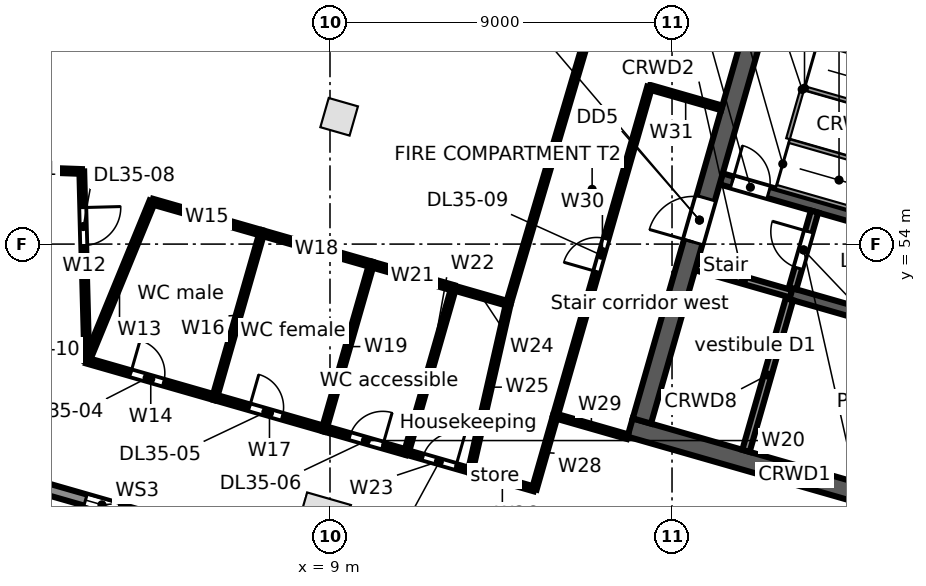
"""IFC4 building model, lengths in metres.
Left out: names, types, materials, properties, quantities, classifications, styles, units other than length and angle.
Written with IfcOpenShell. Run it as: python <this file> out.ifc"""

import sys

from ifc_helpers import new_model, si_unit, direction, frame, frame_2d, origin, origin_2d, place, context, subcontext, project, spatial, rectangle, extrude, element, fill, save


model = new_model("IFC4")
c1 = context("Model", 3, precision=1e-05, world=origin(), true_north=direction((0.0, 1.0)))
c2 = subcontext(c1, "Body", "Model", "MODEL_VIEW")
j1 = project(units=[si_unit("LENGTHUNIT", "METRE"), si_unit("PLANEANGLEUNIT", "RADIAN")], contexts=[c1])
p1 = place(None, origin())
s1 = spatial("IfcSite", under=j1, at=p1, CompositionType="ELEMENT")
p2 = place(p1, origin())
s2 = spatial("IfcBuilding", under=s1, at=p2, CompositionType="ELEMENT")
p3 = place(p2, frame((0.0, 0.0, 166.9)))
s3 = spatial("IfcBuildingStorey", under=s2, at=p3, CompositionType="ELEMENT", Elevation=166.9)
p4 = place(p3, frame((8.81, 46.722, 0.0), z_axis=(0.0, 0.0, 1.0), x_axis=(0.961261695938, -0.275637355817, 0.0)))
e1 = element("IfcColumn", 1, at=p4, inside=s3, PredefinedType="COLUMN", context=c2, shape_type="SweptSolid", body=[
    extrude(rectangle(XDim=1.2, YDim=1.2, at=origin_2d()), origin(), (0.0, 0.0, 1.0), 4.0),
])
p5 = place(p3, frame((9.241, 57.35, 0.0), z_axis=(0.0, 0.0, 1.0), x_axis=(0.961261695938, -0.275637355817, 0.0)))
e2 = element("IfcColumn", 2, at=p5, inside=s3, PredefinedType="COLUMN", context=c2, shape_type="SweptSolid", body=[
    extrude(rectangle(XDim=0.8, YDim=0.8, at=origin_2d()), origin(), (0.0, 0.0, 1.0), 4.0),
])
p6 = place(p3, frame((24.042, 41.106, 0.0), z_axis=(0.0, 0.0, 1.0), x_axis=(-0.961261693976, 0.275637362661, 0.0)))
e3 = element("IfcWall", 3, at=p6, inside=s3, PredefinedType="STANDARD", context=c2, shape_type="SweptSolid", body=[
    extrude(rectangle(XDim=24.948, YDim=0.3, at=frame_2d((12.474, 0.0))), origin(), (0.0, 0.0, 1.0), 3.68),
])
p7 = place(p6, frame((21.441, 0.0, 0.6)))
e4 = element("IfcOpeningElement", 4, at=p7, cuts=e3, PredefinedType="OPENING", context=c2, shape_type="SweptSolid", body=[
    extrude(rectangle(XDim=0.9, YDim=2.4, at=frame_2d((0.45, 1.2))), frame((0.0, 0.16, 0.0), z_axis=(0.0, -1.0, 0.0), x_axis=(1.0, 0.0, 0.0)), (0.0, 0.0, 1.0), 0.32),
])
p8 = place(p6, frame((13.121, 0.0, 0.6)))
e5 = element("IfcOpeningElement", 5, at=p8, cuts=e3, PredefinedType="OPENING", context=c2, shape_type="SweptSolid", body=[
    extrude(rectangle(XDim=0.9, YDim=2.4, at=frame_2d((0.45, 1.2))), frame((0.0, 0.16, 0.0), z_axis=(0.0, -1.0, 0.0), x_axis=(1.0, 0.0, 0.0)), (0.0, 0.0, 1.0), 0.32),
])
p9 = place(p6, frame((10.591, 0.0, 0.0)))
e6 = element("IfcOpeningElement", 6, at=p9, cuts=e3, PredefinedType="OPENING", context=c2, shape_type="SweptSolid", body=[
    extrude(rectangle(XDim=1.8, YDim=2.4, at=frame_2d((0.9, 1.2))), frame((0.0, 0.16, 0.0), z_axis=(0.0, -1.0, 0.0), x_axis=(1.0, 0.0, 0.0)), (0.0, 0.0, 1.0), 0.32),
])
p10 = place(p6, frame((4.8, 0.0, 0.6)))
e7 = element("IfcOpeningElement", 7, at=p10, cuts=e3, PredefinedType="OPENING", context=c2, shape_type="SweptSolid", body=[
    extrude(rectangle(XDim=0.9, YDim=2.4, at=frame_2d((0.45, 1.2))), frame((0.0, 0.16, 0.0), z_axis=(0.0, -1.0, 0.0), x_axis=(1.0, 0.0, 0.0)), (0.0, 0.0, 1.0), 0.32),
])
p11 = place(p6, frame((2.27, 0.0, 0.0)))
e8 = element("IfcOpeningElement", 8, at=p11, cuts=e3, PredefinedType="OPENING", context=c2, shape_type="SweptSolid", body=[
    extrude(rectangle(XDim=1.8, YDim=2.4, at=frame_2d((0.9, 1.2))), frame((0.0, 0.16, 0.0), z_axis=(0.0, -1.0, 0.0), x_axis=(1.0, 0.0, 0.0)), (0.0, 0.0, 1.0), 0.32),
])
p12 = place(p3, frame((16.897, 49.173, 0.0), z_axis=(0.0, 0.0, 1.0), x_axis=(0.96126248289, -0.275634611374, 0.0)))
e9 = element("IfcWall", 9, at=p12, inside=s3, PredefinedType="SOLIDWALL", context=c2, shape_type="SweptSolid", body=[
    extrude(rectangle(XDim=9.0, YDim=0.5, at=frame_2d((4.5, 0.0))), origin(), (0.0, 0.0, 1.0), 3.68),
])
p13 = place(p3, frame((18.632, 53.409, 0.0), z_axis=(0.0, 0.0, 1.0), x_axis=(0.961247078216, -0.275688328772, 0.0)))
e10 = element("IfcWall", 10, at=p13, inside=s3, PredefinedType="SOLIDWALL", context=c2, shape_type="SweptSolid", body=[
    extrude(rectangle(XDim=2.6, YDim=0.2, at=frame_2d((1.3, 0.0))), origin(), (0.0, 0.0, 1.0), 3.68),
])
p14 = place(p3, frame((21.131, 52.692, 0.0), z_axis=(0.0, 0.0, 1.0), x_axis=(0.961271043721, -0.27560475414, 0.0)))
e11 = element("IfcWall", 11, at=p14, inside=s3, PredefinedType="SOLIDWALL", context=c2, shape_type="SweptSolid", body=[
    extrude(rectangle(XDim=5.4, YDim=0.3, at=frame_2d((2.7, 0.0))), origin(), (0.0, 0.0, 1.0), 3.68),
])
p15 = place(p14, frame((2.35, 0.0, 0.0)))
e12 = element("IfcOpeningElement", 12, at=p15, cuts=e11, PredefinedType="OPENING", context=c2, shape_type="SweptSolid", body=[
    extrude(rectangle(XDim=0.9, YDim=2.1, at=frame_2d((0.45, 1.05))), frame((0.0, 0.16, 0.0), z_axis=(0.0, -1.0, 0.0), x_axis=(1.0, 0.0, 0.0)), (0.0, 0.0, 1.0), 0.32),
])
p16 = place(p3, frame((19.293, 55.716, 0.0), z_axis=(0.0, 0.0, 1.0), x_axis=(0.96125862491, -0.275648065539, 0.0)))
e13 = element("IfcWall", 13, at=p16, inside=s3, PredefinedType="SOLIDWALL", context=c2, shape_type="SweptSolid", body=[
    extrude(rectangle(XDim=7.2, YDim=0.3, at=frame_2d((3.6, 0.0))), origin(), (0.0, 0.0, 1.0), 3.68),
])
p17 = place(p16, frame((0.3, 0.0, 0.0)))
e14 = element("IfcOpeningElement", 14, at=p17, cuts=e13, PredefinedType="OPENING", context=c2, shape_type="SweptSolid", body=[
    extrude(rectangle(XDim=1.0, YDim=2.1, at=frame_2d((0.5, 1.05))), frame((0.0, 0.16, 0.0), z_axis=(0.0, -1.0, 0.0), x_axis=(1.0, 0.0, 0.0)), (0.0, 0.0, 1.0), 0.32),
])
p18 = place(p3, frame((20.067, 60.228, 0.0), z_axis=(0.0, 0.0, 1.0), x_axis=(0.96126248289, -0.275634611374, 0.0)))
e15 = element("IfcWall", 15, at=p18, inside=s3, PredefinedType="SOLIDWALL", context=c2, shape_type="SweptSolid", body=[
    extrude(rectangle(XDim=9.0, YDim=0.5, at=frame_2d((4.5, 0.0))), origin(), (0.0, 0.0, 1.0), 3.68),
])
p19 = place(p3, frame((17.206, 49.344, 0.0), z_axis=(0.0, 0.0, 1.0), x_axis=(0.275632651182, 0.961263044958, 0.0)))
e16 = element("IfcWall", 16, at=p19, inside=s3, PredefinedType="SOLIDWALL", context=c2, shape_type="SweptSolid", body=[
    extrude(rectangle(XDim=11.0, YDim=0.5, at=frame_2d((5.5, 0.0))), origin(), (0.0, 0.0, 1.0), 3.68),
])
p20 = place(p19, frame((4.9, 0.0, 0.0)))
e17 = element("IfcOpeningElement", 17, at=p20, cuts=e16, PredefinedType="OPENING", context=c2, shape_type="SweptSolid", body=[
    extrude(rectangle(XDim=1.2, YDim=2.1, at=frame_2d((0.6, 1.05))), frame((0.0, 0.26, 0.0), z_axis=(0.0, -1.0, 0.0), x_axis=(1.0, 0.0, 0.0)), (0.0, 0.0, 1.0), 0.52),
])
p21 = place(p3, frame((19.946, 48.559, 0.0), z_axis=(0.0, 0.0, 1.0), x_axis=(0.275668905258, 0.961252648721, 0.0)))
e18 = element("IfcWall", 18, at=p21, inside=s3, PredefinedType="SOLIDWALL", context=c2, shape_type="SweptSolid", body=[
    extrude(rectangle(XDim=4.15, YDim=0.2, at=frame_2d((2.075, 0.0))), origin(), (0.0, 0.0, 1.0), 3.68),
])
p22 = place(p3, frame((21.172, 52.837, 0.0), z_axis=(0.0, 0.0, 1.0), x_axis=(0.275657676022, 0.961255868981, 0.0)))
e19 = element("IfcWall", 19, at=p22, inside=s3, PredefinedType="PARTITIONING", context=c2, shape_type="SweptSolid", body=[
    extrude(rectangle(XDim=2.1, YDim=0.2, at=frame_2d((1.05, 0.0))), origin(), (0.0, 0.0, 1.0), 3.68),
])
p23 = place(p22, frame((0.55, 0.0, 0.0)))
e20 = element("IfcOpeningElement", 20, at=p23, cuts=e19, PredefinedType="OPENING", context=c2, shape_type="SweptSolid", body=[
    extrude(rectangle(XDim=1.0, YDim=2.1, at=frame_2d((0.5, 1.05))), frame((0.0, 0.11, 0.0), z_axis=(0.0, -1.0, 0.0), x_axis=(1.0, 0.0, 0.0)), (0.0, 0.0, 1.0), 0.22),
])
p24 = place(p3, frame((0.0, 56.0, 0.0), z_axis=(0.0, 0.0, 1.0), x_axis=(0.999349313684, -0.036068673934, 0.0)))
e21 = element("IfcWall", 21, at=p24, inside=s3, PredefinedType="PARTITIONING", context=c2, shape_type="SweptSolid", body=[
    extrude(rectangle(XDim=2.471, YDim=0.125, at=frame_2d((1.235, 0.0))), origin(), (0.0, 0.0, 1.0), 3.68),
])
p25 = place(p3, frame((2.469, 55.911, 0.0), z_axis=(0.0, 0.0, 1.0), x_axis=(0.02651808123, -0.999648333849, 0.0)))
e22 = element("IfcWall", 22, at=p25, inside=s3, PredefinedType="PARTITIONING", context=c2, shape_type="SweptSolid", body=[
    extrude(rectangle(XDim=4.981, YDim=0.125, at=frame_2d((2.49, 0.0))), origin(), (0.0, 0.0, 1.0), 3.68),
])
p26 = place(p25, frame((0.95, 0.0, 0.0)))
e23 = element("IfcOpeningElement", 23, at=p26, cuts=e22, PredefinedType="OPENING", context=c2, shape_type="SweptSolid", body=[
    extrude(rectangle(XDim=1.0, YDim=2.1, at=frame_2d((0.5, 1.05))), frame((0.0, 0.073, 0.0), z_axis=(0.0, -1.0, 0.0), x_axis=(1.0, 0.0, 0.0)), (0.0, 0.0, 1.0), 0.145),
])
p27 = place(p3, frame((2.601, 50.932, 0.0), z_axis=(0.0, 0.0, 1.0), x_axis=(0.380066317543, 0.924959239247, 0.0)))
e24 = element("IfcWall", 24, at=p27, inside=s3, PredefinedType="PARTITIONING", context=c2, shape_type="SweptSolid", body=[
    extrude(rectangle(XDim=4.528, YDim=0.15, at=frame_2d((2.264, 0.0))), origin(), (0.0, 0.0, 1.0), 3.68),
])
p28 = place(p3, frame((2.601, 50.932, 0.0), z_axis=(0.0, 0.0, 1.0), x_axis=(0.961265606965, -0.27562371608, 0.0)))
e25 = element("IfcWall", 25, at=p28, inside=s3, PredefinedType="PARTITIONING", context=c2, shape_type="SweptSolid", body=[
    extrude(rectangle(XDim=3.5, YDim=0.15, at=frame_2d((1.75, 0.0))), origin(), (0.0, 0.0, 1.0), 3.68),
])
p29 = place(p28, frame((1.2, 0.0, 0.0)))
e26 = element("IfcOpeningElement", 26, at=p29, cuts=e25, PredefinedType="OPENING", context=c2, shape_type="SweptSolid", body=[
    extrude(rectangle(XDim=0.9, YDim=2.1, at=frame_2d((0.45, 1.05))), frame((0.0, 0.085, 0.0), z_axis=(0.0, -1.0, 0.0), x_axis=(1.0, 0.0, 0.0)), (0.0, 0.0, 1.0), 0.17),
])
p30 = place(p3, frame((4.322, 55.12, 0.0), z_axis=(0.0, 0.0, 1.0), x_axis=(0.961247103494, -0.275688240636, 0.0)))
e27 = element("IfcWall", 27, at=p30, inside=s3, PredefinedType="PARTITIONING", context=c2, shape_type="SweptSolid", body=[
    extrude(rectangle(XDim=3.0, YDim=0.15, at=frame_2d((1.5, 0.0))), origin(), (0.0, 0.0, 1.0), 3.68),
])
p31 = place(p3, frame((5.966, 49.967, 0.0), z_axis=(0.0, 0.0, 1.0), x_axis=(0.275545040649, 0.96128816209, 0.0)))
e28 = element("IfcWall", 28, at=p31, inside=s3, PredefinedType="PARTITIONING", context=c2, shape_type="SweptSolid", body=[
    extrude(rectangle(XDim=4.5, YDim=0.125, at=frame_2d((2.25, 0.0))), origin(), (0.0, 0.0, 1.0), 3.68),
])
p32 = place(p3, frame((5.966, 49.967, 0.0), z_axis=(0.0, 0.0, 1.0), x_axis=(0.961222353496, -0.275774522283, 0.0)))
e29 = element("IfcWall", 29, at=p32, inside=s3, PredefinedType="PARTITIONING", context=c2, shape_type="SweptSolid", body=[
    extrude(rectangle(XDim=2.999, YDim=0.15, at=frame_2d((1.5, 0.0))), origin(), (0.0, 0.0, 1.0), 2.852),
])
p33 = place(p32, frame((0.95, 0.0, 0.0)))
e30 = element("IfcOpeningElement", 30, at=p33, cuts=e29, PredefinedType="OPENING", context=c2, shape_type="SweptSolid", body=[
    extrude(rectangle(XDim=0.9, YDim=2.1, at=frame_2d((0.45, 1.05))), frame((0.0, 0.085, 0.0), z_axis=(0.0, -1.0, 0.0), x_axis=(1.0, 0.0, 0.0)), (0.0, 0.0, 1.0), 0.17),
])
p34 = place(p3, frame((7.206, 54.293, 0.0), z_axis=(0.0, 0.0, 1.0), x_axis=(0.961268664977, -0.27561305073, 0.0)))
e31 = element("IfcWall", 31, at=p34, inside=s3, PredefinedType="PARTITIONING", context=c2, shape_type="SweptSolid", body=[
    extrude(rectangle(XDim=3.0, YDim=0.15, at=frame_2d((1.5, 0.0))), origin(), (0.0, 0.0, 1.0), 2.852),
])
p35 = place(p3, frame((8.849, 49.14, 0.0), z_axis=(0.0, 0.0, 1.0), x_axis=(0.275731175537, 0.961234788612, 0.0)))
e32 = element("IfcWall", 32, at=p35, inside=s3, PredefinedType="PARTITIONING", context=c2, shape_type="SweptSolid", body=[
    extrude(rectangle(XDim=4.501, YDim=0.125, at=frame_2d((2.25, 0.0))), origin(), (0.0, 0.0, 1.0), 2.852),
])
p36 = place(p3, frame((8.849, 49.14, 0.0), z_axis=(0.0, 0.0, 1.0), x_axis=(0.961298413165, -0.275509275429, 0.0)))
e33 = element("IfcWall", 33, at=p36, inside=s3, PredefinedType="PARTITIONING", context=c2, shape_type="SweptSolid", body=[
    extrude(rectangle(XDim=2.25, YDim=0.15, at=frame_2d((1.125, 0.0))), origin(), (0.0, 0.0, 1.0), 2.748),
])
p37 = place(p36, frame((0.7, 0.0, 0.0)))
e34 = element("IfcOpeningElement", 34, at=p37, cuts=e33, PredefinedType="OPENING", context=c2, shape_type="SweptSolid", body=[
    extrude(rectangle(XDim=0.9, YDim=2.1, at=frame_2d((0.45, 1.05))), frame((0.0, 0.085, 0.0), z_axis=(0.0, -1.0, 0.0), x_axis=(1.0, 0.0, 0.0)), (0.0, 0.0, 1.0), 0.17),
])
p38 = place(p3, frame((10.09, 53.466, 0.0), z_axis=(0.0, 0.0, 1.0), x_axis=(0.961269670038, -0.275609545309, 0.0)))
e35 = element("IfcWall", 35, at=p38, inside=s3, PredefinedType="PARTITIONING", context=c2, shape_type="SweptSolid", body=[
    extrude(rectangle(XDim=2.25, YDim=0.15, at=frame_2d((1.125, 0.0))), origin(), (0.0, 0.0, 1.0), 2.748),
])
p39 = place(p3, frame((11.012, 48.52, 0.0), z_axis=(0.0, 0.0, 1.0), x_axis=(0.275745553681, 0.96123066411, 0.0)))
e36 = element("IfcWall", 36, at=p39, inside=s3, PredefinedType="PARTITIONING", context=c2, shape_type="SweptSolid", body=[
    extrude(rectangle(XDim=4.5, YDim=0.125, at=frame_2d((2.25, 0.0))), origin(), (0.0, 0.0, 1.0), 3.68),
])
p40 = place(p3, frame((11.012, 48.52, 0.0), z_axis=(0.0, 0.0, 1.0), x_axis=(0.961323619822, -0.275421309946, 0.0)))
e37 = element("IfcWall", 37, at=p40, inside=s3, PredefinedType="PARTITIONING", context=c2, shape_type="SweptSolid", body=[
    extrude(rectangle(XDim=1.75, YDim=0.125, at=frame_2d((0.875, 0.0))), origin(), (0.0, 0.0, 1.0), 3.68),
])
p41 = place(p40, frame((0.45, 0.0, 0.0)))
e38 = element("IfcOpeningElement", 38, at=p41, cuts=e37, PredefinedType="OPENING", context=c2, shape_type="SweptSolid", body=[
    extrude(rectangle(XDim=0.9, YDim=2.1, at=frame_2d((0.45, 1.05))), frame((0.0, 0.073, 0.0), z_axis=(0.0, -1.0, 0.0), x_axis=(1.0, 0.0, 0.0)), (0.0, 0.0, 1.0), 0.145),
])
p42 = place(p3, frame((12.253, 52.846, 0.0), z_axis=(0.0, 0.0, 1.0), x_axis=(0.961117390016, -0.276140114089, 0.0)))
e39 = element("IfcWall", 39, at=p42, inside=s3, PredefinedType="PARTITIONING", context=c2, shape_type="SweptSolid", body=[
    extrude(rectangle(XDim=1.5, YDim=0.125, at=frame_2d((0.75, 0.0))), origin(), (0.0, 0.0, 1.0), 3.68),
])
p43 = place(p3, frame((12.694, 48.038, 0.0), z_axis=(0.0, 0.0, 1.0), x_axis=(0.221918494106, 0.975065219344, 0.0)))
e40 = element("IfcWall", 40, at=p43, inside=s3, PredefinedType="PARTITIONING", context=c2, shape_type="SweptSolid", body=[
    extrude(rectangle(XDim=4.506, YDim=0.125, at=frame_2d((2.253, 0.0))), origin(), (0.0, 0.0, 1.0), 3.68),
])
p44 = place(p3, frame((12.694, 48.038, 0.0), z_axis=(0.0, 0.0, 1.0), x_axis=(0.961170605556, -0.275954827854, 0.0)))
e41 = element("IfcWall", 41, at=p44, inside=s3, PredefinedType="PARTITIONING", context=c2, shape_type="SweptSolid", body=[
    extrude(rectangle(XDim=1.751, YDim=0.125, at=frame_2d((0.875, 0.0))), origin(), (0.0, 0.0, 1.0), 3.68),
])
p45 = place(p3, frame((13.694, 52.432, 0.0), z_axis=(0.0, 0.0, 1.0), x_axis=(0.28327517645, 0.959038672008, 0.0)))
e42 = element("IfcWall", 42, at=p45, inside=s3, PredefinedType="PARTITIONING", context=c2, shape_type="SweptSolid", body=[
    extrude(rectangle(XDim=14.886, YDim=0.125, at=frame_2d((7.443, 0.0))), origin(), (0.0, 0.0, 1.0), 2.748),
])
p46 = place(p3, frame((14.377, 47.555, 0.0), z_axis=(0.0, 0.0, 1.0), x_axis=(0.275446387355, 0.961316434736, 0.0)))
e43 = element("IfcWall", 43, at=p46, inside=s3, PredefinedType="PARTITIONING", context=c2, shape_type="SweptSolid", body=[
    extrude(rectangle(XDim=2.0, YDim=0.125, at=frame_2d((1.0, 0.0))), origin(), (0.0, 0.0, 1.0), 3.68),
])
p47 = place(p3, frame((14.928, 49.478, 0.0), z_axis=(0.0, 0.0, 1.0), x_axis=(0.961243778232, -0.27569983462, 0.0)))
e44 = element("IfcWall", 44, at=p47, inside=s3, PredefinedType="PARTITIONING", context=c2, shape_type="SweptSolid", body=[
    extrude(rectangle(XDim=1.977, YDim=0.125, at=frame_2d((0.988, 0.0))), origin(), (0.0, 0.0, 1.0), 3.68),
])
p48 = place(p3, frame((14.928, 49.478, 0.0), z_axis=(0.0, 0.0, 1.0), x_axis=(0.275674053528, 0.961251172281, 0.0)))
e45 = element("IfcWall", 45, at=p48, inside=s3, PredefinedType="PARTITIONING", context=c2, shape_type="SweptSolid", body=[
    extrude(rectangle(XDim=9.0, YDim=0.125, at=frame_2d((4.5, 0.0))), origin(), (0.0, 0.0, 1.0), 2.748),
])
p49 = place(p48, frame((3.95, 0.0, 0.0)))
e46 = element("IfcOpeningElement", 46, at=p49, cuts=e45, PredefinedType="OPENING", context=c2, shape_type="SweptSolid", body=[
    extrude(rectangle(XDim=0.9, YDim=2.1, at=frame_2d((0.45, 1.05))), frame((0.0, 0.073, 0.0), z_axis=(0.0, -1.0, 0.0), x_axis=(1.0, 0.0, 0.0)), (0.0, 0.0, 1.0), 0.145),
])
p50 = place(p3, frame((17.409, 58.129, 0.0), z_axis=(0.0, 0.0, 1.0), x_axis=(0.961253165474, -0.275667103345, 0.0)))
e47 = element("IfcWall", 47, at=p50, inside=s3, PredefinedType="PARTITIONING", context=c2, shape_type="SweptSolid", body=[
    extrude(rectangle(XDim=1.977, YDim=0.125, at=frame_2d((0.988, 0.0))), origin(), (0.0, 0.0, 1.0), 3.68),
])
p51 = place(p7, origin())
e48 = element("IfcWindow", 48, at=p51, inside=s3, PartitioningType="SINGLE_PANEL", PredefinedType="WINDOW", context=c2, shape_type="SweptSolid", body=[
    extrude(rectangle(XDim=0.9, YDim=2.4, at=frame_2d((0.45, 1.2))), frame((0.0, 0.03, 0.0), z_axis=(0.0, -1.0, 0.0), x_axis=(1.0, 0.0, 0.0)), (0.0, 0.0, 1.0), 0.06),
])
fill(e4, e48)
p52 = place(p17, origin())
e49 = element("IfcDoor", 49, at=p52, inside=s3, OperationType="SINGLE_SWING_LEFT", PredefinedType="DOOR", context=c2, shape_type="SweptSolid", body=[
    extrude(rectangle(XDim=1.0, YDim=2.1, at=frame_2d((0.5, 1.05))), frame((0.0, 0.025, 0.0), z_axis=(0.0, -1.0, 0.0), x_axis=(1.0, 0.0, 0.0)), (0.0, 0.0, 1.0), 0.05),
])
fill(e14, e49)
p53 = place(p23, origin())
e50 = element("IfcDoor", 50, at=p53, inside=s3, OperationType="SINGLE_SWING_RIGHT", PredefinedType="DOOR", context=c2, shape_type="SweptSolid", body=[
    extrude(rectangle(XDim=1.0, YDim=2.1, at=frame_2d((0.5, 1.05))), frame((0.0, 0.025, 0.0), z_axis=(0.0, -1.0, 0.0), x_axis=(1.0, 0.0, 0.0)), (0.0, 0.0, 1.0), 0.05),
])
fill(e20, e50)
p54 = place(p20, origin())
e51 = element("IfcDoor", 51, at=p54, inside=s3, OperationType="SINGLE_SWING_LEFT", PredefinedType="DOOR", context=c2, shape_type="SweptSolid", body=[
    extrude(rectangle(XDim=1.2, YDim=2.1, at=frame_2d((0.6, 1.05))), frame((0.0, 0.025, 0.0), z_axis=(0.0, -1.0, 0.0), x_axis=(1.0, 0.0, 0.0)), (0.0, 0.0, 1.0), 0.05),
])
fill(e17, e51)
p55 = place(p29, origin())
e52 = element("IfcDoor", 52, at=p55, inside=s3, OperationType="SINGLE_SWING_LEFT", PredefinedType="DOOR", context=c2, shape_type="SweptSolid", body=[
    extrude(rectangle(XDim=0.9, YDim=2.1, at=frame_2d((0.45, 1.05))), frame((0.0, 0.025, 0.0), z_axis=(0.0, -1.0, 0.0), x_axis=(1.0, 0.0, 0.0)), (0.0, 0.0, 1.0), 0.05),
])
fill(e26, e52)
p56 = place(p33, origin())
e53 = element("IfcDoor", 53, at=p56, inside=s3, OperationType="SINGLE_SWING_LEFT", PredefinedType="DOOR", context=c2, shape_type="SweptSolid", body=[
    extrude(rectangle(XDim=0.9, YDim=2.1, at=frame_2d((0.45, 1.05))), frame((0.0, 0.025, 0.0), z_axis=(0.0, -1.0, 0.0), x_axis=(1.0, 0.0, 0.0)), (0.0, 0.0, 1.0), 0.05),
])
fill(e30, e53)
p57 = place(p37, origin())
e54 = element("IfcDoor", 54, at=p57, inside=s3, OperationType="SINGLE_SWING_RIGHT", PredefinedType="DOOR", context=c2, shape_type="SweptSolid", body=[
    extrude(rectangle(XDim=0.9, YDim=2.1, at=frame_2d((0.45, 1.05))), frame((0.0, 0.025, 0.0), z_axis=(0.0, -1.0, 0.0), x_axis=(1.0, 0.0, 0.0)), (0.0, 0.0, 1.0), 0.05),
])
fill(e34, e54)
p58 = place(p41, origin())
e55 = element("IfcDoor", 55, at=p58, inside=s3, OperationType="SINGLE_SWING_RIGHT", PredefinedType="DOOR", context=c2, shape_type="SweptSolid", body=[
    extrude(rectangle(XDim=0.9, YDim=2.1, at=frame_2d((0.45, 1.05))), frame((0.0, 0.025, 0.0), z_axis=(0.0, -1.0, 0.0), x_axis=(1.0, 0.0, 0.0)), (0.0, 0.0, 1.0), 0.05),
])
fill(e38, e55)
p59 = place(p26, origin())
e56 = element("IfcDoor", 56, at=p59, inside=s3, OperationType="SINGLE_SWING_LEFT", PredefinedType="DOOR", context=c2, shape_type="SweptSolid", body=[
    extrude(rectangle(XDim=1.0, YDim=2.1, at=frame_2d((0.5, 1.05))), frame((0.0, 0.025, 0.0), z_axis=(0.0, -1.0, 0.0), x_axis=(1.0, 0.0, 0.0)), (0.0, 0.0, 1.0), 0.05),
])
fill(e23, e56)
p60 = place(p49, origin())
e57 = element("IfcDoor", 57, at=p60, inside=s3, OperationType="SINGLE_SWING_LEFT", PredefinedType="DOOR", context=c2, shape_type="SweptSolid", body=[
    extrude(rectangle(XDim=0.9, YDim=2.1, at=frame_2d((0.45, 1.05))), frame((0.0, 0.025, 0.0), z_axis=(0.0, -1.0, 0.0), x_axis=(1.0, 0.0, 0.0)), (0.0, 0.0, 1.0), 0.05),
])
fill(e46, e57)
save(model, sys.argv[1])
